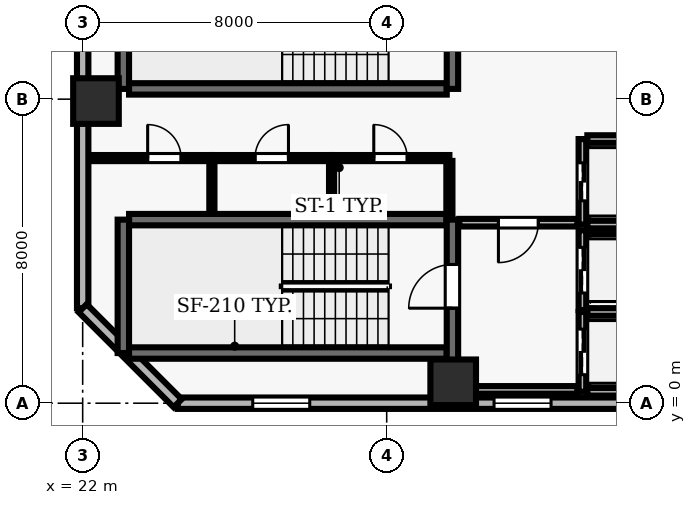
"""IFC4 building model, lengths in metres.
Left out: names, types, materials, properties, quantities, classifications, styles, units other than length and angle.
Written with IfcOpenShell. Run it as: python <this file> out.ifc"""

import sys

from ifc_helpers import new_model, si_unit, direction, frame, frame_2d, origin, origin_2d, place, context, subcontext, project, spatial, rectangle, extrude, element, fill, save


model = new_model("IFC4")
c1 = context("Model", 3, precision=1e-05, world=origin(), true_north=direction((0.0, 1.0)))
c2 = subcontext(c1, "Body", "Model", "MODEL_VIEW")
j1 = project(units=[si_unit("LENGTHUNIT", "METRE"), si_unit("PLANEANGLEUNIT", "RADIAN")], contexts=[c1])
p1 = place(None, origin())
s1 = spatial("IfcSite", under=j1, at=p1, CompositionType="ELEMENT")
p2 = place(p1, origin())
s2 = spatial("IfcBuilding", under=s1, at=p2, CompositionType="ELEMENT")
p3 = place(p2, frame((0.0, 0.0, 154.1)))
s3 = spatial("IfcBuildingStorey", under=s2, at=p3, CompositionType="ELEMENT", Elevation=154.1)
for number, where, z_axis, x_axis in (
    (1, (31.75, 0.55, 0.0), (0.0, 0.0, 1.0), (1.0, 0.0, 0.0)),
    (2, (22.35, 7.95, 0.0), (0.0, 0.0, 1.0), (1.0, 0.0, 0.0)),
):
    element("IfcColumn", number, at=place(p3, frame(where, z_axis=z_axis, x_axis=x_axis)), inside=s3, PredefinedType="COLUMN", context=c2, shape_type="SweptSolid", body=[
        extrude(rectangle(XDim=1.2, YDim=1.2, at=origin_2d()), origin(), (0.0, 0.0, 1.0), 3.9),
    ])
p4 = place(p3, frame((24.5, 0.0, 0.0), z_axis=(0.0, 0.0, 1.0), x_axis=(1.0, 0.0, 0.0)))
e3 = element("IfcWall", 3, at=p4, inside=s3, PredefinedType="SOLIDWALL", context=c2, shape_type="SweptSolid", body=[
    extrude(rectangle(XDim=43.6, YDim=0.3, at=frame_2d((21.8, 0.0))), origin(), (0.0, 0.0, 1.0), 3.69),
])
p5 = place(p4, frame((1.975, 0.0, 0.9)))
e4 = element("IfcOpeningElement", 4, at=p5, cuts=e3, PredefinedType="OPENING", context=c2, shape_type="SweptSolid", body=[
    extrude(rectangle(XDim=1.5, YDim=1.6, at=frame_2d((0.75, 0.8))), frame((0.0, 0.16, 0.0), z_axis=(0.0, -1.0, 0.0), x_axis=(1.0, 0.0, 0.0)), (0.0, 0.0, 1.0), 0.32),
])
p6 = place(p4, frame((8.325, 0.0, 0.9)))
e5 = element("IfcOpeningElement", 5, at=p6, cuts=e3, PredefinedType="OPENING", context=c2, shape_type="SweptSolid", body=[
    extrude(rectangle(XDim=1.5, YDim=1.6, at=frame_2d((0.75, 0.8))), frame((0.0, 0.16, 0.0), z_axis=(0.0, -1.0, 0.0), x_axis=(1.0, 0.0, 0.0)), (0.0, 0.0, 1.0), 0.32),
])
p7 = place(p4, frame((18.325, 0.0, 0.9)))
e6 = element("IfcOpeningElement", 6, at=p7, cuts=e3, PredefinedType="OPENING", context=c2, shape_type="SweptSolid", body=[
    extrude(rectangle(XDim=1.5, YDim=1.6, at=frame_2d((0.75, 0.8))), frame((0.0, 0.16, 0.0), z_axis=(0.0, -1.0, 0.0), x_axis=(1.0, 0.0, 0.0)), (0.0, 0.0, 1.0), 0.32),
])
p8 = place(p4, frame((29.225, 0.0, 0.9)))
e7 = element("IfcOpeningElement", 7, at=p8, cuts=e3, PredefinedType="OPENING", context=c2, shape_type="SweptSolid", body=[
    extrude(rectangle(XDim=1.5, YDim=1.6, at=frame_2d((0.75, 0.8))), frame((0.0, 0.16, 0.0), z_axis=(0.0, -1.0, 0.0), x_axis=(1.0, 0.0, 0.0)), (0.0, 0.0, 1.0), 0.32),
])
p9 = place(p4, frame((40.125, 0.0, 0.9)))
e8 = element("IfcOpeningElement", 8, at=p9, cuts=e3, PredefinedType="OPENING", context=c2, shape_type="SweptSolid", body=[
    extrude(rectangle(XDim=1.5, YDim=1.6, at=frame_2d((0.75, 0.8))), frame((0.0, 0.16, 0.0), z_axis=(0.0, -1.0, 0.0), x_axis=(1.0, 0.0, 0.0)), (0.0, 0.0, 1.0), 0.32),
])
p10 = place(p3, frame((22.0, 46.1, 0.0), z_axis=(0.0, 0.0, 1.0), x_axis=(0.0, -1.0, 0.0)))
e9 = element("IfcWall", 9, at=p10, inside=s3, PredefinedType="SOLIDWALL", context=c2, shape_type="SweptSolid", body=[
    extrude(rectangle(XDim=43.6, YDim=0.3, at=frame_2d((21.8, 0.0))), origin(), (0.0, 0.0, 1.0), 3.69),
])
p11 = place(p10, frame((6.5, 0.0, 0.0)))
e10 = element("IfcOpeningElement", 10, at=p11, cuts=e9, PredefinedType="OPENING", context=c2, shape_type="SweptSolid", body=[
    extrude(rectangle(XDim=1.0, YDim=2.2, at=frame_2d((0.5, 1.1))), frame((0.0, 0.16, 0.0), z_axis=(0.0, -1.0, 0.0), x_axis=(1.0, 0.0, 0.0)), (0.0, 0.0, 1.0), 0.32),
])
p12 = place(p10, frame((11.975, 0.0, 0.9)))
e11 = element("IfcOpeningElement", 11, at=p12, cuts=e9, PredefinedType="OPENING", context=c2, shape_type="SweptSolid", body=[
    extrude(rectangle(XDim=1.5, YDim=1.6, at=frame_2d((0.75, 0.8))), frame((0.0, 0.16, 0.0), z_axis=(0.0, -1.0, 0.0), x_axis=(1.0, 0.0, 0.0)), (0.0, 0.0, 1.0), 0.32),
])
p13 = place(p10, frame((17.875, 0.0, 0.9)))
e12 = element("IfcOpeningElement", 12, at=p13, cuts=e9, PredefinedType="OPENING", context=c2, shape_type="SweptSolid", body=[
    extrude(rectangle(XDim=1.5, YDim=1.6, at=frame_2d((0.75, 0.8))), frame((0.0, 0.16, 0.0), z_axis=(0.0, -1.0, 0.0), x_axis=(1.0, 0.0, 0.0)), (0.0, 0.0, 1.0), 0.32),
])
p14 = place(p10, frame((23.775, 0.0, 0.9)))
e13 = element("IfcOpeningElement", 13, at=p14, cuts=e9, PredefinedType="OPENING", context=c2, shape_type="SweptSolid", body=[
    extrude(rectangle(XDim=1.5, YDim=1.6, at=frame_2d((0.75, 0.8))), frame((0.0, 0.16, 0.0), z_axis=(0.0, -1.0, 0.0), x_axis=(1.0, 0.0, 0.0)), (0.0, 0.0, 1.0), 0.32),
])
p15 = place(p10, frame((28.775, 0.0, 0.9)))
e14 = element("IfcOpeningElement", 14, at=p15, cuts=e9, PredefinedType="OPENING", context=c2, shape_type="SweptSolid", body=[
    extrude(rectangle(XDim=1.5, YDim=1.6, at=frame_2d((0.75, 0.8))), frame((0.0, 0.16, 0.0), z_axis=(0.0, -1.0, 0.0), x_axis=(1.0, 0.0, 0.0)), (0.0, 0.0, 1.0), 0.32),
])
p16 = place(p10, frame((34.675, 0.0, 0.9)))
e15 = element("IfcOpeningElement", 15, at=p16, cuts=e9, PredefinedType="OPENING", context=c2, shape_type="SweptSolid", body=[
    extrude(rectangle(XDim=1.5, YDim=1.6, at=frame_2d((0.75, 0.8))), frame((0.0, 0.16, 0.0), z_axis=(0.0, -1.0, 0.0), x_axis=(1.0, 0.0, 0.0)), (0.0, 0.0, 1.0), 0.32),
])
p17 = place(p3, frame((22.0, 2.5, 0.0), z_axis=(0.0, 0.0, 1.0), x_axis=(0.707106781187, -0.707106781187, 0.0)))
e16 = element("IfcWall", 16, at=p17, inside=s3, PredefinedType="SOLIDWALL", context=c2, shape_type="SweptSolid", body=[
    extrude(rectangle(XDim=3.536, YDim=0.3, at=frame_2d((1.768, 0.0))), origin(), (0.0, 0.0, 1.0), 3.69),
])
p18 = place(p3, frame((31.58, 4.83, 0.0), z_axis=(0.0, 0.0, 1.0), x_axis=(-1.0, 0.0, 0.0)))
e17 = element("IfcWall", 17, at=p18, inside=s3, PredefinedType="SHEAR", context=c2, shape_type="SweptSolid", body=[
    extrude(rectangle(XDim=8.36, YDim=0.3, at=frame_2d((4.18, 0.0))), origin(), (0.0, 0.0, 1.0), 3.69),
])
p19 = place(p3, frame((23.07, 4.83, 0.0), z_axis=(0.0, 0.0, 1.0), x_axis=(0.0, -1.0, 0.0)))
e18 = element("IfcWall", 18, at=p19, inside=s3, PredefinedType="SHEAR", context=c2, shape_type="SweptSolid", body=[
    extrude(rectangle(XDim=3.51, YDim=0.3, at=frame_2d((1.755, 0.0))), origin(), (0.0, 0.0, 1.0), 3.69),
])
p20 = place(p3, frame((23.22, 1.32, 0.0), z_axis=(0.0, 0.0, 1.0), x_axis=(1.0, 0.0, 0.0)))
e19 = element("IfcWall", 19, at=p20, inside=s3, PredefinedType="SHEAR", context=c2, shape_type="SweptSolid", body=[
    extrude(rectangle(XDim=8.36, YDim=0.3, at=frame_2d((4.18, 0.0))), origin(), (0.0, 0.0, 1.0), 3.69),
])
p21 = place(p3, frame((31.73, 0.96, 0.0), z_axis=(0.0, 0.0, 1.0), x_axis=(0.0, 1.0, 0.0)))
e20 = element("IfcWall", 20, at=p21, inside=s3, PredefinedType="SHEAR", context=c2, shape_type="SweptSolid", body=[
    extrude(rectangle(XDim=3.87, YDim=0.3, at=frame_2d((1.935, 0.0))), origin(), (0.0, 0.0, 1.0), 3.69),
])
p22 = place(p21, frame((1.54, 0.0, 0.0)))
e21 = element("IfcOpeningElement", 21, at=p22, cuts=e20, PredefinedType="OPENING", context=c2, shape_type="SweptSolid", body=[
    extrude(rectangle(XDim=1.15, YDim=2.15, at=frame_2d((0.575, 1.075))), frame((0.0, 0.16, 0.0), z_axis=(0.0, -1.0, 0.0), x_axis=(1.0, 0.0, 0.0)), (0.0, 0.0, 1.0), 0.32),
])
p23 = place(p3, frame((23.07, 11.78, 0.0), z_axis=(0.0, 0.0, 1.0), x_axis=(0.0, -1.0, 0.0)))
e22 = element("IfcWall", 22, at=p23, inside=s3, PredefinedType="SHEAR", context=c2, shape_type="SweptSolid", body=[
    extrude(rectangle(XDim=3.51, YDim=0.3, at=frame_2d((1.755, 0.0))), origin(), (0.0, 0.0, 1.0), 3.69),
])
p24 = place(p3, frame((23.22, 8.27, 0.0), z_axis=(0.0, 0.0, 1.0), x_axis=(1.0, 0.0, 0.0)))
e23 = element("IfcWall", 23, at=p24, inside=s3, PredefinedType="SHEAR", context=c2, shape_type="SweptSolid", body=[
    extrude(rectangle(XDim=8.36, YDim=0.3, at=frame_2d((4.18, 0.0))), origin(), (0.0, 0.0, 1.0), 3.69),
])
p25 = place(p3, frame((31.73, 8.27, 0.0), z_axis=(0.0, 0.0, 1.0), x_axis=(0.0, 1.0, 0.0)))
e24 = element("IfcWall", 24, at=p25, inside=s3, PredefinedType="SHEAR", context=c2, shape_type="SweptSolid", body=[
    extrude(rectangle(XDim=3.51, YDim=0.3, at=frame_2d((1.755, 0.0))), origin(), (0.0, 0.0, 1.0), 3.69),
])
p26 = place(p25, frame((1.18, 0.0, 0.0)))
e25 = element("IfcOpeningElement", 25, at=p26, cuts=e24, PredefinedType="OPENING", context=c2, shape_type="SweptSolid", body=[
    extrude(rectangle(XDim=1.15, YDim=2.15, at=frame_2d((0.575, 1.075))), frame((0.0, 0.16, 0.0), z_axis=(0.0, -1.0, 0.0), x_axis=(1.0, 0.0, 0.0)), (0.0, 0.0, 1.0), 0.32),
])
p27 = place(p3, frame((35.15, 2.4, 0.0), z_axis=(0.0, 0.0, 1.0), x_axis=(0.0, -1.0, 0.0)))
e26 = element("IfcWall", 26, at=p27, inside=s3, PredefinedType="SOLIDWALL", context=c2, shape_type="SweptSolid", body=[
    extrude(rectangle(XDim=2.1, YDim=0.2, at=frame_2d((1.05, 0.0))), origin(), (0.0, 0.0, 1.0), 3.69),
])
p28 = place(p27, frame((0.45, 0.0, 0.0)))
e27 = element("IfcOpeningElement", 27, at=p28, cuts=e26, PredefinedType="OPENING", context=c2, shape_type="SweptSolid", body=[
    extrude(rectangle(XDim=1.2, YDim=2.15, at=frame_2d((0.6, 1.075))), frame((0.0, 0.11, 0.0), z_axis=(0.0, -1.0, 0.0), x_axis=(1.0, 0.0, 0.0)), (0.0, 0.0, 1.0), 0.22),
])
for number, where, z_axis, x_axis in (
    (28, (35.28, 0.3, 0.0), (0.0, 0.0, 1.0), (1.0, 0.0, 0.0)),
    (29, (37.42, 2.4, 0.0), (0.0, 0.0, 1.0), (-1.0, 0.0, 0.0)),
):
    element("IfcWall", number, at=place(p3, frame(where, z_axis=z_axis, x_axis=x_axis)), inside=s3, PredefinedType="SOLIDWALL", context=c2, shape_type="SweptSolid", body=[
        extrude(rectangle(XDim=2.14, YDim=0.2, at=frame_2d((1.07, 0.0))), origin(), (0.0, 0.0, 1.0), 3.69),
    ])
p29 = place(p3, frame((35.15, 4.55, 0.0), z_axis=(0.0, 0.0, 1.0), x_axis=(0.0, -1.0, 0.0)))
e30 = element("IfcWall", 30, at=p29, inside=s3, PredefinedType="SOLIDWALL", context=c2, shape_type="SweptSolid", body=[
    extrude(rectangle(XDim=2.1, YDim=0.2, at=frame_2d((1.05, 0.0))), origin(), (0.0, 0.0, 1.0), 3.69),
])
p30 = place(p29, frame((0.45, 0.0, 0.0)))
e31 = element("IfcOpeningElement", 31, at=p30, cuts=e30, PredefinedType="OPENING", context=c2, shape_type="SweptSolid", body=[
    extrude(rectangle(XDim=1.2, YDim=2.15, at=frame_2d((0.6, 1.075))), frame((0.0, 0.11, 0.0), z_axis=(0.0, -1.0, 0.0), x_axis=(1.0, 0.0, 0.0)), (0.0, 0.0, 1.0), 0.22),
])
p31 = place(p3, frame((37.42, 4.55, 0.0), z_axis=(0.0, 0.0, 1.0), x_axis=(-1.0, 0.0, 0.0)))
e32 = element("IfcWall", 32, at=p31, inside=s3, PredefinedType="SOLIDWALL", context=c2, shape_type="SweptSolid", body=[
    extrude(rectangle(XDim=2.14, YDim=0.2, at=frame_2d((1.07, 0.0))), origin(), (0.0, 0.0, 1.0), 3.69),
])
p32 = place(p3, frame((35.15, 6.95, 0.0), z_axis=(0.0, 0.0, 1.0), x_axis=(0.0, -1.0, 0.0)))
e33 = element("IfcWall", 33, at=p32, inside=s3, PredefinedType="SOLIDWALL", context=c2, shape_type="SweptSolid", body=[
    extrude(rectangle(XDim=2.25, YDim=0.2, at=frame_2d((1.125, 0.0))), origin(), (0.0, 0.0, 1.0), 3.69),
])
p33 = place(p32, frame((0.625, 0.0, 0.0)))
e34 = element("IfcOpeningElement", 34, at=p33, cuts=e33, PredefinedType="OPENING", context=c2, shape_type="SweptSolid", body=[
    extrude(rectangle(XDim=1.0, YDim=2.1, at=frame_2d((0.5, 1.05))), frame((0.0, 0.11, 0.0), z_axis=(0.0, -1.0, 0.0), x_axis=(1.0, 0.0, 0.0)), (0.0, 0.0, 1.0), 0.22),
])
for number, where, z_axis, x_axis in (
    (35, (35.28, 4.7, 0.0), (0.0, 0.0, 1.0), (1.0, 0.0, 0.0)),
    (36, (37.42, 6.95, 0.0), (0.0, 0.0, 1.0), (-1.0, 0.0, 0.0)),
):
    element("IfcWall", number, at=place(p3, frame(where, z_axis=z_axis, x_axis=x_axis)), inside=s3, PredefinedType="SOLIDWALL", context=c2, shape_type="SweptSolid", body=[
        extrude(rectangle(XDim=2.14, YDim=0.2, at=frame_2d((1.07, 0.0))), origin(), (0.0, 0.0, 1.0), 3.69),
    ])
p34 = place(p3, frame((22.2, 6.45, 0.0), z_axis=(0.0, 0.0, 1.0), x_axis=(1.0, 0.0, 0.0)))
e37 = element("IfcWall", 37, at=p34, inside=s3, PredefinedType="PARTITIONING", context=c2, shape_type="SweptSolid", body=[
    extrude(rectangle(XDim=3.2, YDim=0.16, at=frame_2d((1.6, 0.0))), origin(), (0.0, 0.0, 1.0), 3.69),
])
p35 = place(p34, frame((1.51, 0.0, 0.0)))
e38 = element("IfcOpeningElement", 38, at=p35, cuts=e37, PredefinedType="OPENING", context=c2, shape_type="SweptSolid", body=[
    extrude(rectangle(XDim=0.88, YDim=2.1, at=frame_2d((0.44, 1.05))), frame((0.0, 0.09, 0.0), z_axis=(0.0, -1.0, 0.0), x_axis=(1.0, 0.0, 0.0)), (0.0, 0.0, 1.0), 0.18),
])
p36 = place(p3, frame((25.4, 6.45, 0.0), z_axis=(0.0, 0.0, 1.0), x_axis=(1.0, 0.0, 0.0)))
e39 = element("IfcWall", 39, at=p36, inside=s3, PredefinedType="PARTITIONING", context=c2, shape_type="SweptSolid", body=[
    extrude(rectangle(XDim=3.15, YDim=0.16, at=frame_2d((1.575, 0.0))), origin(), (0.0, 0.0, 1.0), 3.69),
])
p37 = place(p36, frame((1.135, 0.0, 0.0)))
e40 = element("IfcOpeningElement", 40, at=p37, cuts=e39, PredefinedType="OPENING", context=c2, shape_type="SweptSolid", body=[
    extrude(rectangle(XDim=0.88, YDim=2.1, at=frame_2d((0.44, 1.05))), frame((0.0, 0.09, 0.0), z_axis=(0.0, -1.0, 0.0), x_axis=(1.0, 0.0, 0.0)), (0.0, 0.0, 1.0), 0.18),
])
p38 = place(p3, frame((28.55, 6.45, 0.0), z_axis=(0.0, 0.0, 1.0), x_axis=(1.0, 0.0, 0.0)))
e41 = element("IfcWall", 41, at=p38, inside=s3, PredefinedType="PARTITIONING", context=c2, shape_type="SweptSolid", body=[
    extrude(rectangle(XDim=3.1, YDim=0.16, at=frame_2d((1.55, 0.0))), origin(), (0.0, 0.0, 1.0), 3.69),
])
p39 = place(p38, frame((1.11, 0.0, 0.0)))
e42 = element("IfcOpeningElement", 42, at=p39, cuts=e41, PredefinedType="OPENING", context=c2, shape_type="SweptSolid", body=[
    extrude(rectangle(XDim=0.88, YDim=2.1, at=frame_2d((0.44, 1.05))), frame((0.0, 0.09, 0.0), z_axis=(0.0, -1.0, 0.0), x_axis=(1.0, 0.0, 0.0)), (0.0, 0.0, 1.0), 0.18),
])
p40 = place(p3, frame((31.65, 0.35, 0.0), z_axis=(0.0, 0.0, 1.0), x_axis=(1.0, 0.0, 0.0)))
e43 = element("IfcWall", 43, at=p40, inside=s3, PredefinedType="SOLIDWALL", context=c2, shape_type="SweptSolid", body=[
    extrude(rectangle(XDim=3.37, YDim=0.2, at=frame_2d((1.685, 0.0))), origin(), (0.0, 0.0, 1.0), 3.69),
])
p41 = place(p3, frame((35.02, 4.75, 0.0), z_axis=(0.0, 0.0, 1.0), x_axis=(-1.0, 0.0, 0.0)))
e44 = element("IfcWall", 44, at=p41, inside=s3, PredefinedType="SOLIDWALL", context=c2, shape_type="SweptSolid", body=[
    extrude(rectangle(XDim=3.11, YDim=0.2, at=frame_2d((1.555, 0.0))), origin(), (0.0, 0.0, 1.0), 3.69),
])
p42 = place(p41, frame((1.03, 0.0, 0.0)))
e45 = element("IfcOpeningElement", 45, at=p42, cuts=e44, PredefinedType="OPENING", context=c2, shape_type="SweptSolid", body=[
    extrude(rectangle(XDim=1.05, YDim=2.15, at=frame_2d((0.525, 1.075))), frame((0.0, 0.11, 0.0), z_axis=(0.0, -1.0, 0.0), x_axis=(1.0, 0.0, 0.0)), (0.0, 0.0, 1.0), 0.22),
])
for number, where, z_axis, x_axis in (
    (46, (25.4, 5.01, 0.0), (0.0, 0.0, 1.0), (0.0, 1.0, 0.0)),
    (47, (28.55, 5.01, 0.0), (0.0, 0.0, 1.0), (0.0, 1.0, 0.0)),
):
    element("IfcWall", number, at=place(p3, frame(where, z_axis=z_axis, x_axis=x_axis)), inside=s3, PredefinedType="PARTITIONING", context=c2, shape_type="SweptSolid", body=[
        extrude(rectangle(XDim=1.365, YDim=0.135, at=frame_2d((0.683, 0.0))), origin(), (0.0, 0.0, 1.0), 3.69),
    ])
p43 = place(p3, frame((31.65, 4.86, 0.0), z_axis=(0.0, 0.0, 1.0), x_axis=(0.0, 1.0, 0.0)))
e48 = element("IfcWall", 48, at=p43, inside=s3, PredefinedType="PARTITIONING", context=c2, shape_type="SweptSolid", body=[
    extrude(rectangle(XDim=1.515, YDim=0.16, at=frame_2d((0.757, 0.0))), origin(), (0.0, 0.0, 1.0), 3.69),
])
p44 = place(p5, origin())
e49 = element("IfcWindow", 49, at=p44, inside=s3, PartitioningType="SINGLE_PANEL", PredefinedType="WINDOW", context=c2, shape_type="SweptSolid", body=[
    extrude(rectangle(XDim=1.5, YDim=1.6, at=frame_2d((0.75, 0.8))), frame((0.0, 0.03, 0.0), z_axis=(0.0, -1.0, 0.0), x_axis=(1.0, 0.0, 0.0)), (0.0, 0.0, 1.0), 0.06),
])
fill(e4, e49)
p45 = place(p6, origin())
e50 = element("IfcWindow", 50, at=p45, inside=s3, PartitioningType="SINGLE_PANEL", PredefinedType="WINDOW", context=c2, shape_type="SweptSolid", body=[
    extrude(rectangle(XDim=1.5, YDim=1.6, at=frame_2d((0.75, 0.8))), frame((0.0, 0.03, 0.0), z_axis=(0.0, -1.0, 0.0), x_axis=(1.0, 0.0, 0.0)), (0.0, 0.0, 1.0), 0.06),
])
fill(e5, e50)
p46 = place(p22, origin())
e51 = element("IfcDoor", 51, at=p46, inside=s3, OperationType="SINGLE_SWING_LEFT", PredefinedType="DOOR", context=c2, shape_type="SweptSolid", body=[
    extrude(rectangle(XDim=1.15, YDim=2.15, at=frame_2d((0.575, 1.075))), frame((0.0, 0.025, 0.0), z_axis=(0.0, -1.0, 0.0), x_axis=(1.0, 0.0, 0.0)), (0.0, 0.0, 1.0), 0.05),
])
fill(e21, e51)
p47 = place(p28, origin())
e52 = element("IfcDoor", 52, at=p47, inside=s3, OperationType="DOUBLE_DOOR_SLIDING", PredefinedType="DOOR", context=c2, shape_type="SweptSolid", body=[
    extrude(rectangle(XDim=1.2, YDim=2.15, at=frame_2d((0.6, 1.075))), frame((0.0, 0.025, 0.0), z_axis=(0.0, -1.0, 0.0), x_axis=(1.0, 0.0, 0.0)), (0.0, 0.0, 1.0), 0.05),
])
fill(e27, e52)
p48 = place(p30, origin())
e53 = element("IfcDoor", 53, at=p48, inside=s3, OperationType="DOUBLE_DOOR_SLIDING", PredefinedType="DOOR", context=c2, shape_type="SweptSolid", body=[
    extrude(rectangle(XDim=1.2, YDim=2.15, at=frame_2d((0.6, 1.075))), frame((0.0, 0.025, 0.0), z_axis=(0.0, -1.0, 0.0), x_axis=(1.0, 0.0, 0.0)), (0.0, 0.0, 1.0), 0.05),
])
fill(e31, e53)
p49 = place(p33, origin())
e54 = element("IfcDoor", 54, at=p49, inside=s3, OperationType="DOUBLE_DOOR_SLIDING", PredefinedType="DOOR", context=c2, shape_type="SweptSolid", body=[
    extrude(rectangle(XDim=1.0, YDim=2.1, at=frame_2d((0.5, 1.05))), frame((0.0, 0.025, 0.0), z_axis=(0.0, -1.0, 0.0), x_axis=(1.0, 0.0, 0.0)), (0.0, 0.0, 1.0), 0.05),
])
fill(e34, e54)
p50 = place(p42, origin())
e55 = element("IfcDoor", 55, at=p50, inside=s3, OperationType="SINGLE_SWING_RIGHT", PredefinedType="DOOR", context=c2, shape_type="SweptSolid", body=[
    extrude(rectangle(XDim=1.05, YDim=2.15, at=frame_2d((0.525, 1.075))), frame((0.0, 0.025, 0.0), z_axis=(0.0, -1.0, 0.0), x_axis=(1.0, 0.0, 0.0)), (0.0, 0.0, 1.0), 0.05),
])
fill(e45, e55)
p51 = place(p35, origin())
e56 = element("IfcDoor", 56, at=p51, inside=s3, OperationType="SINGLE_SWING_LEFT", PredefinedType="DOOR", context=c2, shape_type="SweptSolid", body=[
    extrude(rectangle(XDim=0.88, YDim=2.1, at=frame_2d((0.44, 1.05))), frame((0.0, 0.025, 0.0), z_axis=(0.0, -1.0, 0.0), x_axis=(1.0, 0.0, 0.0)), (0.0, 0.0, 1.0), 0.05),
])
fill(e38, e56)
p52 = place(p37, origin())
e57 = element("IfcDoor", 57, at=p52, inside=s3, OperationType="SINGLE_SWING_RIGHT", PredefinedType="DOOR", context=c2, shape_type="SweptSolid", body=[
    extrude(rectangle(XDim=0.88, YDim=2.1, at=frame_2d((0.44, 1.05))), frame((0.0, 0.025, 0.0), z_axis=(0.0, -1.0, 0.0), x_axis=(1.0, 0.0, 0.0)), (0.0, 0.0, 1.0), 0.05),
])
fill(e40, e57)
p53 = place(p39, origin())
e58 = element("IfcDoor", 58, at=p53, inside=s3, OperationType="SINGLE_SWING_LEFT", PredefinedType="DOOR", context=c2, shape_type="SweptSolid", body=[
    extrude(rectangle(XDim=0.88, YDim=2.1, at=frame_2d((0.44, 1.05))), frame((0.0, 0.025, 0.0), z_axis=(0.0, -1.0, 0.0), x_axis=(1.0, 0.0, 0.0)), (0.0, 0.0, 1.0), 0.05),
])
fill(e42, e58)
save(model, sys.argv[1])
